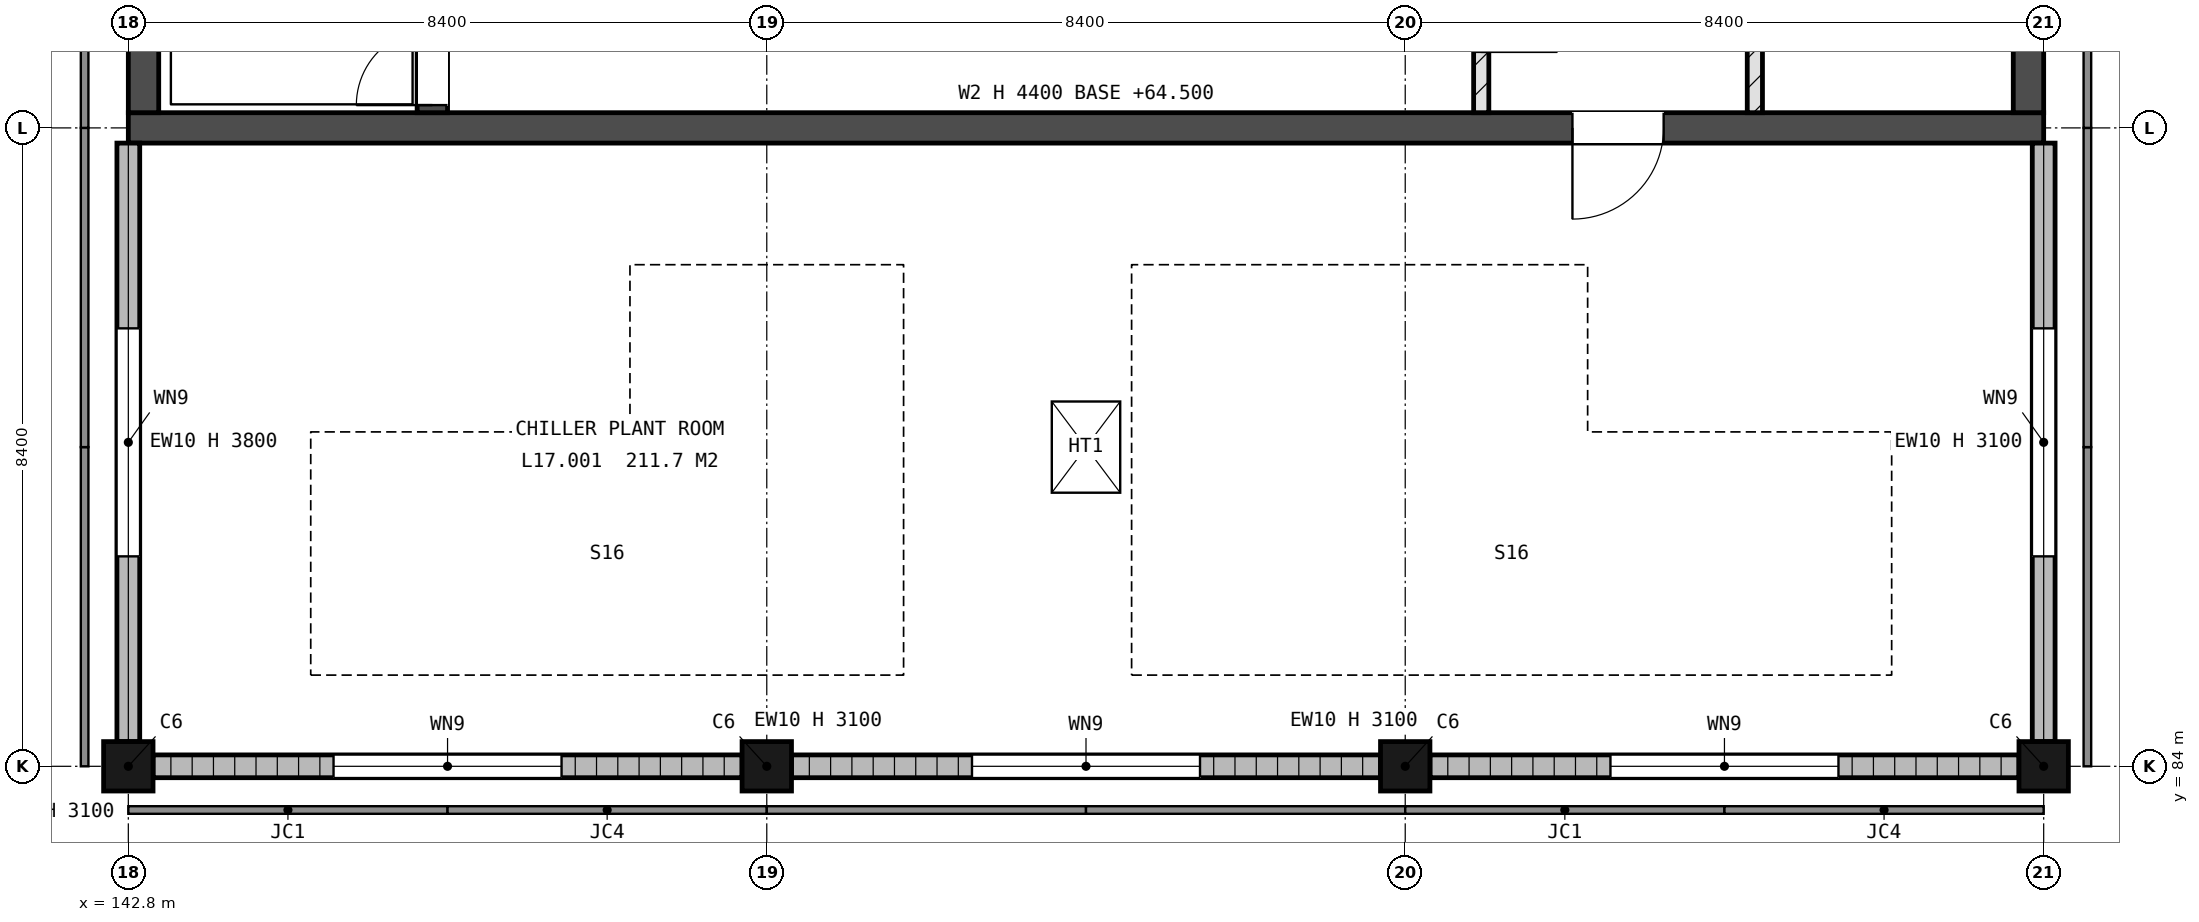
"""IFC4 building model, lengths in metres.
Left out: names, types, materials, properties, quantities, classifications, styles, units other than length and angle.
Written with IfcOpenShell. Run it as: python <this file> out.ifc"""

import sys

from ifc_helpers import new_model, si_unit, direction, frame, frame_2d, origin, origin_2d, place, context, subcontext, project, spatial, rectangle, extrude, element, fill, save


model = new_model("IFC4")
c1 = context("Model", 3, precision=1e-05, world=origin(), true_north=direction((0.0, 1.0)))
c2 = subcontext(c1, "Body", "Model", "MODEL_VIEW")
j1 = project(units=[si_unit("LENGTHUNIT", "METRE"), si_unit("PLANEANGLEUNIT", "RADIAN")], contexts=[c1])
p1 = place(None, origin())
s1 = spatial("IfcSite", under=j1, at=p1, CompositionType="ELEMENT")
p2 = place(p1, origin())
s2 = spatial("IfcBuilding", under=s1, at=p2, CompositionType="ELEMENT")
p3 = place(p2, frame((0.0, 0.0, 64.8)))
s3 = spatial("IfcBuildingStorey", under=s2, at=p3, CompositionType="ELEMENT", Elevation=64.8)
for number, where, z_axis, x_axis in (
    (1, (142.8, 84.0, -0.3), (0.0, 0.0, 1.0), (1.0, 0.0, 0.0)),
    (2, (151.2, 84.0, -0.3), (0.0, 0.0, 1.0), (1.0, 0.0, 0.0)),
    (3, (159.6, 84.0, -0.3), (0.0, 0.0, 1.0), (1.0, 0.0, 0.0)),
    (4, (168.0, 84.0, -0.3), (0.0, 0.0, 1.0), (1.0, 0.0, 0.0)),
):
    element("IfcColumn", number, at=place(p3, frame(where, z_axis=z_axis, x_axis=x_axis)), inside=s3, PredefinedType="COLUMN", context=c2, shape_type="SweptSolid", body=[
        extrude(rectangle(XDim=0.65, YDim=0.65, at=origin_2d()), origin(), (0.0, 0.0, 1.0), 4.4),
    ])
p4 = place(p3, frame((142.8, 92.4, -0.3), z_axis=(0.0, 0.0, 1.0), x_axis=(1.0, 0.0, 0.0)))
e5 = element("IfcWall", 5, at=p4, inside=s3, PredefinedType="SHEAR", context=c2, shape_type="SweptSolid", body=[
    extrude(rectangle(XDim=25.2, YDim=0.4, at=frame_2d((12.6, 0.0))), origin(), (0.0, 0.0, 1.0), 4.4),
])
p5 = place(p4, frame((19.0, 0.0, 0.3)))
e6 = element("IfcOpeningElement", 6, at=p5, cuts=e5, PredefinedType="OPENING", context=c2, shape_type="SweptSolid", body=[
    extrude(rectangle(XDim=1.2, YDim=2.4, at=frame_2d((0.6, 1.2))), frame((0.0, 0.21, 0.0), z_axis=(0.0, -1.0, 0.0), x_axis=(1.0, 0.0, 0.0)), (0.0, 0.0, 1.0), 0.42),
])
for number, where, z_axis, x_axis in (
    (7, (143.0, 92.6, -0.3), (0.0, 0.0, 1.0), (0.0, 1.0, 0.0)),
    (8, (167.8, 92.6, -0.3), (0.0, 0.0, 1.0), (0.0, 1.0, 0.0)),
):
    element("IfcWall", number, at=place(p3, frame(where, z_axis=z_axis, x_axis=x_axis)), inside=s3, PredefinedType="SHEAR", context=c2, shape_type="SweptSolid", body=[
        extrude(rectangle(XDim=16.4, YDim=0.4, at=frame_2d((8.2, 0.0))), origin(), (0.0, 0.0, 1.0), 4.4),
    ])
p6 = place(p3, frame((146.8, 92.6, -0.3), z_axis=(0.0, 0.0, 1.0), x_axis=(0.0, 1.0, 0.0)))
e9 = element("IfcWall", 9, at=p6, inside=s3, PredefinedType="SHEAR", context=c2, shape_type="SweptSolid", body=[
    extrude(rectangle(XDim=7.525, YDim=0.4, at=frame_2d((3.762, 0.0))), origin(), (0.0, 0.0, 1.0), 4.4),
])
p7 = place(p6, frame((0.1, 0.0, 0.3)))
e10 = element("IfcOpeningElement", 10, at=p7, cuts=e9, PredefinedType="OPENING", context=c2, shape_type="SweptSolid", body=[
    extrude(rectangle(XDim=1.0, YDim=2.1, at=frame_2d((0.5, 1.05))), frame((0.0, 0.21, 0.0), z_axis=(0.0, -1.0, 0.0), x_axis=(1.0, 0.0, 0.0)), (0.0, 0.0, 1.0), 0.42),
])
p8 = place(p3, frame((143.125, 84.0, 0.0), z_axis=(0.0, 0.0, 1.0), x_axis=(1.0, 0.0, 0.0)))
e11 = element("IfcWall", 11, at=p8, inside=s3, PredefinedType="STANDARD", context=c2, shape_type="SweptSolid", body=[
    extrude(rectangle(XDim=7.75, YDim=0.3, at=frame_2d((3.875, 0.0))), origin(), (0.0, 0.0, 1.0), 3.1),
])
p9 = place(p8, frame((2.375, 0.0, 0.55)))
e12 = element("IfcOpeningElement", 12, at=p9, cuts=e11, PredefinedType="OPENING", context=c2, shape_type="SweptSolid", body=[
    extrude(rectangle(XDim=3.0, YDim=2.4, at=frame_2d((1.5, 1.2))), frame((0.0, 0.16, 0.0), z_axis=(0.0, -1.0, 0.0), x_axis=(1.0, 0.0, 0.0)), (0.0, 0.0, 1.0), 0.32),
])
p10 = place(p3, frame((151.525, 84.0, 0.0), z_axis=(0.0, 0.0, 1.0), x_axis=(1.0, 0.0, 0.0)))
e13 = element("IfcWall", 13, at=p10, inside=s3, PredefinedType="STANDARD", context=c2, shape_type="SweptSolid", body=[
    extrude(rectangle(XDim=7.75, YDim=0.3, at=frame_2d((3.875, 0.0))), origin(), (0.0, 0.0, 1.0), 3.1),
])
p11 = place(p10, frame((2.375, 0.0, 0.55)))
e14 = element("IfcOpeningElement", 14, at=p11, cuts=e13, PredefinedType="OPENING", context=c2, shape_type="SweptSolid", body=[
    extrude(rectangle(XDim=3.0, YDim=2.4, at=frame_2d((1.5, 1.2))), frame((0.0, 0.16, 0.0), z_axis=(0.0, -1.0, 0.0), x_axis=(1.0, 0.0, 0.0)), (0.0, 0.0, 1.0), 0.32),
])
p12 = place(p3, frame((159.925, 84.0, 0.0), z_axis=(0.0, 0.0, 1.0), x_axis=(1.0, 0.0, 0.0)))
e15 = element("IfcWall", 15, at=p12, inside=s3, PredefinedType="STANDARD", context=c2, shape_type="SweptSolid", body=[
    extrude(rectangle(XDim=7.75, YDim=0.3, at=frame_2d((3.875, 0.0))), origin(), (0.0, 0.0, 1.0), 3.1),
])
p13 = place(p12, frame((2.375, 0.0, 0.55)))
e16 = element("IfcOpeningElement", 16, at=p13, cuts=e15, PredefinedType="OPENING", context=c2, shape_type="SweptSolid", body=[
    extrude(rectangle(XDim=3.0, YDim=2.4, at=frame_2d((1.5, 1.2))), frame((0.0, 0.16, 0.0), z_axis=(0.0, -1.0, 0.0), x_axis=(1.0, 0.0, 0.0)), (0.0, 0.0, 1.0), 0.32),
])
p14 = place(p3, frame((142.8, 84.325, 0.0), z_axis=(0.0, 0.0, 1.0), x_axis=(0.0, 1.0, 0.0)))
e17 = element("IfcWall", 17, at=p14, inside=s3, PredefinedType="STANDARD", context=c2, shape_type="SweptSolid", body=[
    extrude(rectangle(XDim=7.875, YDim=0.3, at=frame_2d((3.938, 0.0))), origin(), (0.0, 0.0, 1.0), 3.8),
])
p15 = place(p14, frame((2.438, 0.0, 0.55)))
e18 = element("IfcOpeningElement", 18, at=p15, cuts=e17, PredefinedType="OPENING", context=c2, shape_type="SweptSolid", body=[
    extrude(rectangle(XDim=3.0, YDim=2.4, at=frame_2d((1.5, 1.2))), frame((0.0, 0.16, 0.0), z_axis=(0.0, -1.0, 0.0), x_axis=(1.0, 0.0, 0.0)), (0.0, 0.0, 1.0), 0.32),
])
p16 = place(p3, frame((168.0, 84.325, 0.0), z_axis=(0.0, 0.0, 1.0), x_axis=(0.0, 1.0, 0.0)))
e19 = element("IfcWall", 19, at=p16, inside=s3, PredefinedType="STANDARD", context=c2, shape_type="SweptSolid", body=[
    extrude(rectangle(XDim=7.875, YDim=0.3, at=frame_2d((3.938, 0.0))), origin(), (0.0, 0.0, 1.0), 3.1),
])
p17 = place(p16, frame((2.438, 0.0, 0.55)))
e20 = element("IfcOpeningElement", 20, at=p17, cuts=e19, PredefinedType="OPENING", context=c2, shape_type="SweptSolid", body=[
    extrude(rectangle(XDim=3.0, YDim=2.4, at=frame_2d((1.5, 1.2))), frame((0.0, 0.16, 0.0), z_axis=(0.0, -1.0, 0.0), x_axis=(1.0, 0.0, 0.0)), (0.0, 0.0, 1.0), 0.32),
])
p18 = place(p3, frame((160.6, 92.6, 0.0), z_axis=(0.0, 0.0, 1.0), x_axis=(0.0, 1.0, 0.0)))
e21 = element("IfcWall", 21, at=p18, inside=s3, PredefinedType="SOLIDWALL", context=c2, shape_type="SweptSolid", body=[
    extrude(rectangle(XDim=12.5, YDim=0.2, at=frame_2d((6.25, 0.0))), origin(), (0.0, 0.0, 1.0), 3.8),
])
p19 = place(p18, frame((5.1, 0.0, 0.0)))
e22 = element("IfcOpeningElement", 22, at=p19, cuts=e21, PredefinedType="OPENING", context=c2, shape_type="SweptSolid", body=[
    extrude(rectangle(XDim=0.8, YDim=2.1, at=frame_2d((0.4, 1.05))), frame((0.0, 0.11, 0.0), z_axis=(0.0, -1.0, 0.0), x_axis=(1.0, 0.0, 0.0)), (0.0, 0.0, 1.0), 0.22),
])
p20 = place(p18, frame((9.7, 0.0, 0.0)))
e23 = element("IfcOpeningElement", 23, at=p20, cuts=e21, PredefinedType="OPENING", context=c2, shape_type="SweptSolid", body=[
    extrude(rectangle(XDim=1.0, YDim=2.1, at=frame_2d((0.5, 1.05))), frame((0.0, 0.11, 0.0), z_axis=(0.0, -1.0, 0.0), x_axis=(1.0, 0.0, 0.0)), (0.0, 0.0, 1.0), 0.22),
])
p21 = place(p18, frame((0.8, 0.0, 0.0)))
e24 = element("IfcOpeningElement", 24, at=p21, cuts=e21, PredefinedType="OPENING", context=c2, shape_type="SweptSolid", body=[
    extrude(rectangle(XDim=1.0, YDim=2.1, at=frame_2d((0.5, 1.05))), frame((0.0, 0.11, 0.0), z_axis=(0.0, -1.0, 0.0), x_axis=(1.0, 0.0, 0.0)), (0.0, 0.0, 1.0), 0.22),
])
p22 = place(p3, frame((164.2, 92.6, 0.0), z_axis=(0.0, 0.0, 1.0), x_axis=(0.0, 1.0, 0.0)))
e25 = element("IfcWall", 25, at=p22, inside=s3, PredefinedType="SOLIDWALL", context=c2, shape_type="SweptSolid", body=[
    extrude(rectangle(XDim=8.75, YDim=0.2, at=frame_2d((4.375, 0.0))), origin(), (0.0, 0.0, 1.0), 3.8),
])
p23 = place(p22, frame((1.7, 0.0, 0.0)))
e26 = element("IfcOpeningElement", 26, at=p23, cuts=e25, PredefinedType="OPENING", context=c2, shape_type="SweptSolid", body=[
    extrude(rectangle(XDim=0.8, YDim=2.1, at=frame_2d((0.4, 1.05))), frame((0.0, 0.11, 0.0), z_axis=(0.0, -1.0, 0.0), x_axis=(1.0, 0.0, 0.0)), (0.0, 0.0, 1.0), 0.22),
])
p24 = place(p22, frame((6.3, 0.0, 0.0)))
e27 = element("IfcOpeningElement", 27, at=p24, cuts=e25, PredefinedType="OPENING", context=c2, shape_type="SweptSolid", body=[
    extrude(rectangle(XDim=0.8, YDim=2.1, at=frame_2d((0.4, 1.05))), frame((0.0, 0.11, 0.0), z_axis=(0.0, -1.0, 0.0), x_axis=(1.0, 0.0, 0.0)), (0.0, 0.0, 1.0), 0.22),
])
p25 = place(p9, origin())
e28 = element("IfcWindow", 28, at=p25, inside=s3, PartitioningType="SINGLE_PANEL", PredefinedType="WINDOW", context=c2, shape_type="SweptSolid", body=[
    extrude(rectangle(XDim=3.0, YDim=2.4, at=frame_2d((1.5, 1.2))), frame((0.0, 0.03, 0.0), z_axis=(0.0, -1.0, 0.0), x_axis=(1.0, 0.0, 0.0)), (0.0, 0.0, 1.0), 0.06),
])
fill(e12, e28)
p26 = place(p11, origin())
e29 = element("IfcWindow", 29, at=p26, inside=s3, PartitioningType="SINGLE_PANEL", PredefinedType="WINDOW", context=c2, shape_type="SweptSolid", body=[
    extrude(rectangle(XDim=3.0, YDim=2.4, at=frame_2d((1.5, 1.2))), frame((0.0, 0.03, 0.0), z_axis=(0.0, -1.0, 0.0), x_axis=(1.0, 0.0, 0.0)), (0.0, 0.0, 1.0), 0.06),
])
fill(e14, e29)
p27 = place(p13, origin())
e30 = element("IfcWindow", 30, at=p27, inside=s3, PartitioningType="SINGLE_PANEL", PredefinedType="WINDOW", context=c2, shape_type="SweptSolid", body=[
    extrude(rectangle(XDim=3.0, YDim=2.4, at=frame_2d((1.5, 1.2))), frame((0.0, 0.03, 0.0), z_axis=(0.0, -1.0, 0.0), x_axis=(1.0, 0.0, 0.0)), (0.0, 0.0, 1.0), 0.06),
])
fill(e16, e30)
p28 = place(p15, origin())
e31 = element("IfcWindow", 31, at=p28, inside=s3, PartitioningType="SINGLE_PANEL", PredefinedType="WINDOW", context=c2, shape_type="SweptSolid", body=[
    extrude(rectangle(XDim=3.0, YDim=2.4, at=frame_2d((1.5, 1.2))), frame((0.0, 0.03, 0.0), z_axis=(0.0, -1.0, 0.0), x_axis=(1.0, 0.0, 0.0)), (0.0, 0.0, 1.0), 0.06),
])
fill(e18, e31)
p29 = place(p17, origin())
e32 = element("IfcWindow", 32, at=p29, inside=s3, PartitioningType="SINGLE_PANEL", PredefinedType="WINDOW", context=c2, shape_type="SweptSolid", body=[
    extrude(rectangle(XDim=3.0, YDim=2.4, at=frame_2d((1.5, 1.2))), frame((0.0, 0.03, 0.0), z_axis=(0.0, -1.0, 0.0), x_axis=(1.0, 0.0, 0.0)), (0.0, 0.0, 1.0), 0.06),
])
fill(e20, e32)
p30 = place(p2, frame((0.0, 0.0, 68.9)))
p31 = place(p30, frame((0.0, 0.0, -0.3)))
p32 = place(p31, frame((155.4, 88.2, 0.0)))
p33 = place(p32, frame((0.0, 0.0, 0.25)))
e33 = element("IfcWindow", 33, at=p33, inside=s3, PartitioningType="SINGLE_PANEL", PredefinedType="SKYLIGHT", context=c2, shape_type="SweptSolid", body=[
    extrude(rectangle(XDim=0.9, YDim=1.2, at=origin_2d()), origin(), (0.0, 0.0, 1.0), 0.05),
])
p34 = place(p7, origin())
e34 = element("IfcDoor", 34, at=p34, inside=s3, OperationType="SINGLE_SWING_RIGHT", PredefinedType="DOOR", context=c2, shape_type="SweptSolid", body=[
    extrude(rectangle(XDim=1.0, YDim=2.1, at=frame_2d((0.5, 1.05))), frame((0.0, 0.025, 0.0), z_axis=(0.0, -1.0, 0.0), x_axis=(1.0, 0.0, 0.0)), (0.0, 0.0, 1.0), 0.05),
])
fill(e10, e34)
p35 = place(p5, origin())
e35 = element("IfcDoor", 35, at=p35, inside=s3, OperationType="SINGLE_SWING_LEFT", PredefinedType="DOOR", context=c2, shape_type="SweptSolid", body=[
    extrude(rectangle(XDim=1.2, YDim=2.4, at=frame_2d((0.6, 1.2))), frame((0.0, 0.025, 0.0), z_axis=(0.0, -1.0, 0.0), x_axis=(1.0, 0.0, 0.0)), (0.0, 0.0, 1.0), 0.05),
])
fill(e6, e35)
save(model, sys.argv[1])
